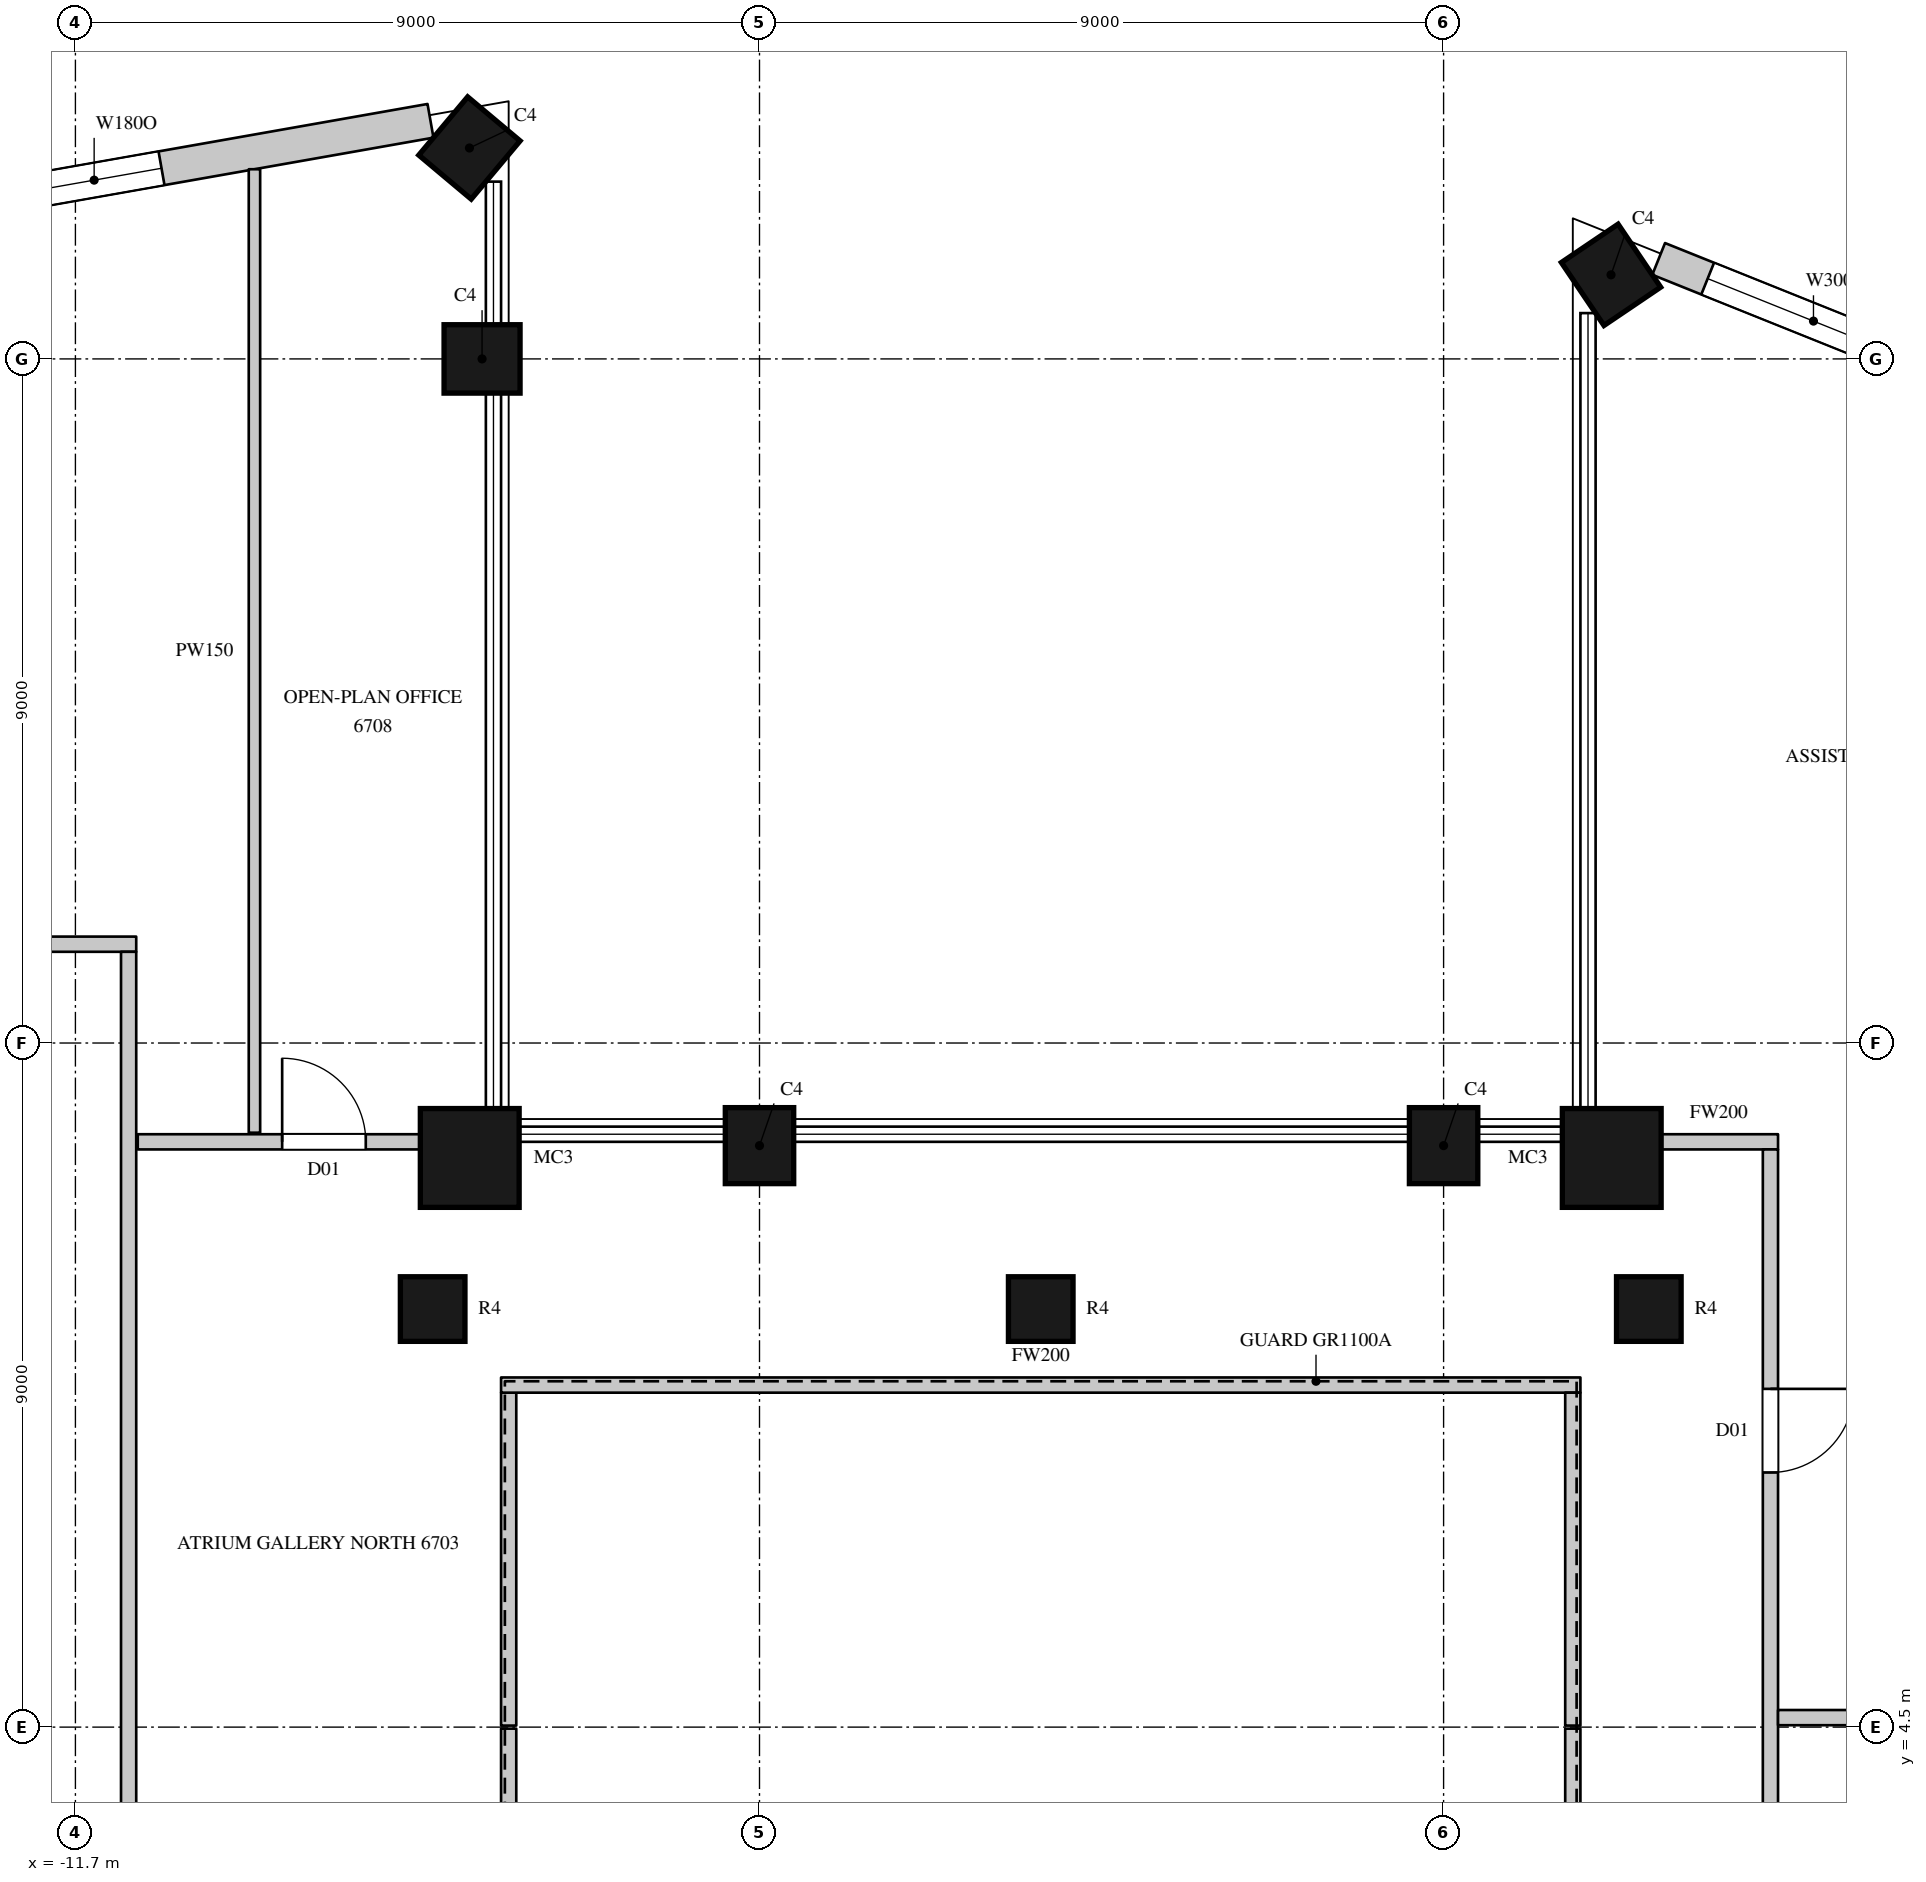
"""IFC4 building model, lengths in metres.
Left out: names, types, materials, properties, quantities, classifications, styles, units other than length and angle.
Written with IfcOpenShell. Run it as: python <this file> out.ifc"""

import sys

from ifc_helpers import new_model, si_unit, direction, frame, frame_2d, origin, origin_2d, place, context, subcontext, project, spatial, rectangle, circle, extrude, element, fill, save


model = new_model("IFC4")
c1 = context("Model", 3, precision=1e-05, world=origin(), true_north=direction((0.0, 1.0)))
c2 = subcontext(c1, "Body", "Model", "MODEL_VIEW")
j1 = project(units=[si_unit("LENGTHUNIT", "METRE"), si_unit("PLANEANGLEUNIT", "RADIAN")], contexts=[c1])
p1 = place(None, origin())
s1 = spatial("IfcSite", under=j1, at=p1, CompositionType="ELEMENT")
p2 = place(p1, origin())
s2 = spatial("IfcBuilding", under=s1, at=p2, CompositionType="ELEMENT")
p3 = place(p2, frame((0.0, 0.0, 296.7)))
s3 = spatial("IfcBuildingStorey", under=s2, at=p3, CompositionType="ELEMENT", Elevation=296.7)
p4 = place(p3, frame((8.503, 23.606, 0.0), z_axis=(0.0, 0.0, 1.0), x_axis=(-0.828469606019, -0.560034027451, 0.0)))
e1 = element("IfcColumn", 1, at=p4, inside=s3, PredefinedType="COLUMN", context=c2, shape_type="SweptSolid", body=[
    extrude(rectangle(XDim=0.9, YDim=1.0, at=origin_2d()), origin(), (0.0, 0.0, 1.0), 4.1),
])
p5 = place(p3, frame((8.512, 11.988, 0.0), z_axis=(0.0, 0.0, 1.0), x_axis=(1.0, 0.0, 0.0)))
e2 = element("IfcColumn", 2, at=p5, inside=s3, PredefinedType="COLUMN", context=c2, shape_type="SweptSolid", body=[
    extrude(circle(Radius=0.65, at=origin_2d()), origin(), (0.0, 0.0, 1.0), 4.1),
])
for number, where, z_axis, x_axis in (
    (3, (6.3, 12.15, 0.0), (0.0, 0.0, 1.0), (-1.0, 0.0, 0.0)),
    (4, (-2.7, 12.15, 0.0), (0.0, 0.0, 1.0), (-1.0, 0.0, 0.0)),
):
    element("IfcColumn", number, at=place(p3, frame(where, z_axis=z_axis, x_axis=x_axis)), inside=s3, PredefinedType="COLUMN", context=c2, shape_type="SweptSolid", body=[
        extrude(rectangle(XDim=0.9, YDim=1.0, at=origin_2d()), origin(), (0.0, 0.0, 1.0), 4.1),
    ])
p6 = place(p3, frame((-6.512, 11.988, 0.0), z_axis=(0.0, 0.0, 1.0), x_axis=(1.0, 0.0, 0.0)))
e5 = element("IfcColumn", 5, at=p6, inside=s3, PredefinedType="COLUMN", context=c2, shape_type="SweptSolid", body=[
    extrude(circle(Radius=0.65, at=origin_2d()), origin(), (0.0, 0.0, 1.0), 4.1),
])
for number, where, z_axis, x_axis in (
    (6, (-6.35, 22.5, 0.0), (0.0, 0.0, 1.0), (0.0, 1.0, 0.0)),
    (7, (-6.516, 25.275, 0.0), (0.0, 0.0, 1.0), (-0.766, 0.643, 0.0)),
):
    element("IfcColumn", number, at=place(p3, frame(where, z_axis=z_axis, x_axis=x_axis)), inside=s3, PredefinedType="COLUMN", context=c2, shape_type="SweptSolid", body=[
        extrude(rectangle(XDim=0.9, YDim=1.0, at=origin_2d()), origin(), (0.0, 0.0, 1.0), 4.1),
    ])
for number, where, z_axis, x_axis in (
    (8, (-7.0, 10.0, 0.0), (0.0, 0.0, 1.0), (1.0, 0.0, 0.0)),
    (9, (1.0, 10.0, 0.0), (0.0, 0.0, 1.0), (1.0, 0.0, 0.0)),
    (10, (9.0, 10.0, 0.0), (0.0, 0.0, 1.0), (1.0, 0.0, 0.0)),
):
    element("IfcColumn", number, at=place(p3, frame(where, z_axis=z_axis, x_axis=x_axis)), inside=s3, PredefinedType="COLUMN", context=c2, shape_type="SweptSolid", body=[
        extrude(circle(Radius=0.425, at=origin_2d()), origin(), (0.0, 0.0, 1.0), 4.1),
    ])
p7 = place(p3, frame((-7.029, 25.632, 0.0), z_axis=(0.0, 0.0, 1.0), x_axis=(-0.984797606634, -0.173705710808, 0.0)))
e11 = element("IfcWall", 11, at=p7, inside=s3, PredefinedType="SOLIDWALL", context=c2, shape_type="SweptSolid", body=[
    extrude(rectangle(XDim=5.772, YDim=0.45, at=frame_2d((2.886, 0.0))), origin(), (0.0, 0.0, 1.0), 3.8),
])
p8 = place(p7, frame((3.593, 0.0, 1.05)))
e12 = element("IfcOpeningElement", 12, at=p8, cuts=e11, PredefinedType="OPENING", context=c2, shape_type="SweptSolid", body=[
    extrude(rectangle(XDim=1.8, YDim=2.4, at=frame_2d((0.9, 1.2))), frame((0.0, 0.235, 0.0), z_axis=(0.0, -1.0, 0.0), x_axis=(1.0, 0.0, 0.0)), (0.0, 0.0, 1.0), 0.47),
])
p9 = place(p3, frame((13.529, 22.048, 0.0), z_axis=(0.0, 0.0, 1.0), x_axis=(-0.927957332619, 0.372686448424, 0.0)))
e13 = element("IfcWall", 13, at=p9, inside=s3, PredefinedType="SOLIDWALL", context=c2, shape_type="SweptSolid", body=[
    extrude(rectangle(XDim=4.741, YDim=0.45, at=frame_2d((2.371, 0.0))), origin(), (0.0, 0.0, 1.0), 3.8),
])
p10 = place(p9, frame((1.047, 0.0, 1.05)))
e14 = element("IfcOpeningElement", 14, at=p10, cuts=e13, PredefinedType="OPENING", context=c2, shape_type="SweptSolid", body=[
    extrude(rectangle(XDim=3.0, YDim=2.4, at=frame_2d((1.5, 1.2))), frame((0.0, 0.235, 0.0), z_axis=(0.0, -1.0, 0.0), x_axis=(1.0, 0.0, 0.0)), (0.0, 0.0, 1.0), 0.47),
])
p11 = place(p3, frame((-13.97, 14.8, 0.0), z_axis=(0.0, 0.0, 1.0), x_axis=(1.0, 0.0, 0.0)))
e15 = element("IfcWall", 15, at=p11, inside=s3, PredefinedType="PARTITIONING", context=c2, shape_type="SweptSolid", body=[
    extrude(rectangle(XDim=3.07, YDim=0.2, at=frame_2d((1.535, 0.0))), origin(), (0.0, 0.0, 1.0), 3.8),
])
p12 = place(p3, frame((-11.0, -14.8, 0.0), z_axis=(0.0, 0.0, 1.0), x_axis=(0.0, 1.0, 0.0)))
e16 = element("IfcWall", 16, at=p12, inside=s3, PredefinedType="PARTITIONING", context=c2, shape_type="SweptSolid", body=[
    extrude(rectangle(XDim=29.5, YDim=0.2, at=frame_2d((14.75, 0.0))), origin(), (0.0, 0.0, 1.0), 3.8),
])
p13 = place(p12, frame((10.5, 0.0, 0.0)))
e17 = element("IfcOpeningElement", 17, at=p13, cuts=e16, PredefinedType="OPENING", context=c2, shape_type="SweptSolid", body=[
    extrude(rectangle(XDim=1.5, YDim=2.4, at=frame_2d((0.75, 1.2))), frame((0.0, 0.11, 0.0), z_axis=(0.0, -1.0, 0.0), x_axis=(1.0, 0.0, 0.0)), (0.0, 0.0, 1.0), 0.22),
])
p14 = place(p3, frame((-10.88, 12.2, 0.0), z_axis=(0.0, 0.0, 1.0), x_axis=(1.0, 0.0, 0.0)))
e18 = element("IfcWall", 18, at=p14, inside=s3, PredefinedType="PARTITIONING", context=c2, shape_type="SweptSolid", body=[
    extrude(rectangle(XDim=3.736, YDim=0.2, at=frame_2d((1.868, 0.0))), origin(), (0.0, 0.0, 1.0), 3.8),
])
p15 = place(p14, frame((1.9, 0.0, 0.0)))
e19 = element("IfcOpeningElement", 19, at=p15, cuts=e18, PredefinedType="OPENING", context=c2, shape_type="SweptSolid", body=[
    extrude(rectangle(XDim=1.1, YDim=2.4, at=frame_2d((0.55, 1.2))), frame((0.0, 0.11, 0.0), z_axis=(0.0, -1.0, 0.0), x_axis=(1.0, 0.0, 0.0)), (0.0, 0.0, 1.0), 0.22),
])
p16 = place(p3, frame((-6.0, -8.9, 0.0), z_axis=(0.0, 0.0, 1.0), x_axis=(0.0, 1.0, 0.0)))
e20 = element("IfcWall", 20, at=p16, inside=s3, PredefinedType="PARTITIONING", context=c2, shape_type="SweptSolid", body=[
    extrude(rectangle(XDim=13.38, YDim=0.2, at=frame_2d((6.69, 0.0))), origin(), (0.0, 0.0, 1.0), 3.8),
])
p17 = place(p3, frame((-6.0, 4.52, 0.0), z_axis=(0.0, 0.0, 1.0), x_axis=(0.0, 1.0, 0.0)))
e21 = element("IfcWall", 21, at=p17, inside=s3, PredefinedType="PARTITIONING", context=c2, shape_type="SweptSolid", body=[
    extrude(rectangle(XDim=4.38, YDim=0.2, at=frame_2d((2.19, 0.0))), origin(), (0.0, 0.0, 1.0), 3.8),
])
p18 = place(p3, frame((-6.1, 9.0, 0.0), z_axis=(0.0, 0.0, 1.0), x_axis=(1.0, 0.0, 0.0)))
e22 = element("IfcWall", 22, at=p18, inside=s3, PredefinedType="PARTITIONING", context=c2, shape_type="SweptSolid", body=[
    extrude(rectangle(XDim=14.2, YDim=0.2, at=frame_2d((7.1, 0.0))), origin(), (0.0, 0.0, 1.0), 3.8),
])
p19 = place(p3, frame((8.0, -8.9, 0.0), z_axis=(0.0, 0.0, 1.0), x_axis=(0.0, 1.0, 0.0)))
e23 = element("IfcWall", 23, at=p19, inside=s3, PredefinedType="PARTITIONING", context=c2, shape_type="SweptSolid", body=[
    extrude(rectangle(XDim=13.38, YDim=0.2, at=frame_2d((6.69, 0.0))), origin(), (0.0, 0.0, 1.0), 3.8),
])
p20 = place(p3, frame((8.0, 4.52, 0.0), z_axis=(0.0, 0.0, 1.0), x_axis=(0.0, 1.0, 0.0)))
e24 = element("IfcWall", 24, at=p20, inside=s3, PredefinedType="PARTITIONING", context=c2, shape_type="SweptSolid", body=[
    extrude(rectangle(XDim=4.38, YDim=0.2, at=frame_2d((2.19, 0.0))), origin(), (0.0, 0.0, 1.0), 3.8),
])
p21 = place(p3, frame((9.144, 12.2, 0.0), z_axis=(0.0, 0.0, 1.0), x_axis=(1.0, 0.0, 0.0)))
e25 = element("IfcWall", 25, at=p21, inside=s3, PredefinedType="PARTITIONING", context=c2, shape_type="SweptSolid", body=[
    extrude(rectangle(XDim=1.556, YDim=0.2, at=frame_2d((0.778, 0.0))), origin(), (0.0, 0.0, 1.0), 3.8),
])
p22 = place(p3, frame((10.6, -11.6, 0.0), z_axis=(0.0, 0.0, 1.0), x_axis=(0.0, 1.0, 0.0)))
e26 = element("IfcWall", 26, at=p22, inside=s3, PredefinedType="PARTITIONING", context=c2, shape_type="SweptSolid", body=[
    extrude(rectangle(XDim=23.7, YDim=0.2, at=frame_2d((11.85, 0.0))), origin(), (0.0, 0.0, 1.0), 3.8),
])
p23 = place(p22, frame((9.45, 0.0, 0.0)))
e27 = element("IfcOpeningElement", 27, at=p23, cuts=e26, PredefinedType="OPENING", context=c2, shape_type="SweptSolid", body=[
    extrude(rectangle(XDim=1.5, YDim=2.4, at=frame_2d((0.75, 1.2))), frame((0.0, 0.11, 0.0), z_axis=(0.0, -1.0, 0.0), x_axis=(1.0, 0.0, 0.0)), (0.0, 0.0, 1.0), 0.22),
])
p24 = place(p22, frame((19.45, 0.0, 0.0)))
e28 = element("IfcOpeningElement", 28, at=p24, cuts=e26, PredefinedType="OPENING", context=c2, shape_type="SweptSolid", body=[
    extrude(rectangle(XDim=1.1, YDim=2.4, at=frame_2d((0.55, 1.2))), frame((0.0, 0.11, 0.0), z_axis=(0.0, -1.0, 0.0), x_axis=(1.0, 0.0, 0.0)), (0.0, 0.0, 1.0), 0.22),
])
p25 = place(p22, frame((4.6, 0.0, 0.0)))
e29 = element("IfcOpeningElement", 29, at=p25, cuts=e26, PredefinedType="OPENING", context=c2, shape_type="SweptSolid", body=[
    extrude(rectangle(XDim=1.1, YDim=2.4, at=frame_2d((0.55, 1.2))), frame((0.0, 0.11, 0.0), z_axis=(0.0, -1.0, 0.0), x_axis=(1.0, 0.0, 0.0)), (0.0, 0.0, 1.0), 0.22),
])
p26 = place(p3, frame((10.7, 4.625, 0.0), z_axis=(0.0, 0.0, 1.0), x_axis=(1.0, 0.0, 0.0)))
e30 = element("IfcWall", 30, at=p26, inside=s3, PredefinedType="PARTITIONING", context=c2, shape_type="SweptSolid", body=[
    extrude(rectangle(XDim=3.975, YDim=0.2, at=frame_2d((1.988, 0.0))), origin(), (0.0, 0.0, 1.0), 3.8),
])
p27 = place(p3, frame((-9.344, 12.32, 0.0), z_axis=(0.0, 0.0, 1.0), x_axis=(0.0, 1.0, 0.0)))
e31 = element("IfcWall", 31, at=p27, inside=s3, PredefinedType="PARTITIONING", context=c2, shape_type="SweptSolid", body=[
    extrude(rectangle(XDim=12.675, YDim=0.15, at=frame_2d((6.338, 0.0))), origin(), (0.0, 0.0, 1.0), 3.8),
])
p28 = place(p8, origin())
e32 = element("IfcWindow", 32, at=p28, inside=s3, PartitioningType="SINGLE_PANEL", PredefinedType="WINDOW", context=c2, shape_type="SweptSolid", body=[
    extrude(rectangle(XDim=1.8, YDim=2.4, at=frame_2d((0.9, 1.2))), frame((0.0, 0.135, 0.0), z_axis=(0.0, -1.0, 0.0), x_axis=(1.0, 0.0, 0.0)), (0.0, 0.0, 1.0), 0.06),
])
fill(e12, e32)
p29 = place(p10, origin())
e33 = element("IfcWindow", 33, at=p29, inside=s3, PartitioningType="SINGLE_PANEL", PredefinedType="WINDOW", context=c2, shape_type="SweptSolid", body=[
    extrude(rectangle(XDim=3.0, YDim=2.4, at=frame_2d((1.5, 1.2))), frame((0.0, 0.135, 0.0), z_axis=(0.0, -1.0, 0.0), x_axis=(1.0, 0.0, 0.0)), (0.0, 0.0, 1.0), 0.06),
])
fill(e14, e33)
p30 = place(p15, origin())
e34 = element("IfcDoor", 34, at=p30, inside=s3, OperationType="SINGLE_SWING_LEFT", PredefinedType="DOOR", context=c2, shape_type="SweptSolid", body=[
    extrude(rectangle(XDim=1.1, YDim=2.4, at=frame_2d((0.55, 1.2))), frame((0.0, 0.025, 0.0), z_axis=(0.0, -1.0, 0.0), x_axis=(1.0, 0.0, 0.0)), (0.0, 0.0, 1.0), 0.05),
])
fill(e19, e34)
p31 = place(p24, origin())
e35 = element("IfcDoor", 35, at=p31, inside=s3, OperationType="SINGLE_SWING_LEFT", PredefinedType="DOOR", context=c2, shape_type="SweptSolid", body=[
    extrude(rectangle(XDim=1.1, YDim=2.4, at=frame_2d((0.55, 1.2))), frame((0.0, 0.025, 0.0), z_axis=(0.0, -1.0, 0.0), x_axis=(1.0, 0.0, 0.0)), (0.0, 0.0, 1.0), 0.05),
])
fill(e28, e35)
save(model, sys.argv[1])
